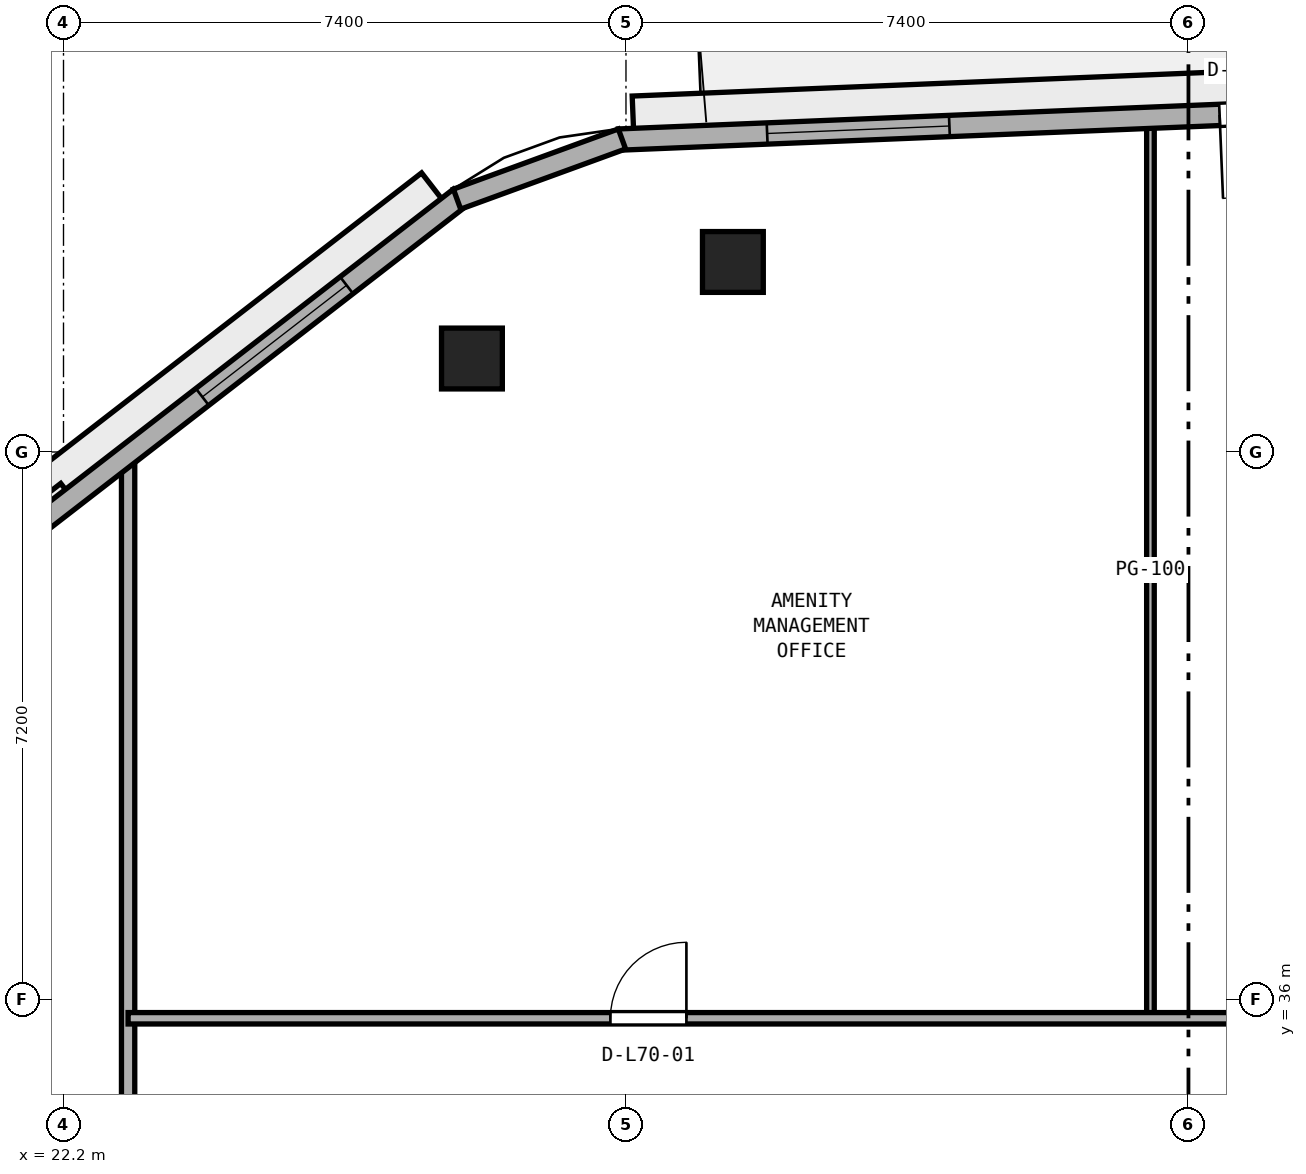
"""IFC4 building model, lengths in metres.
Left out: names, types, materials, properties, quantities, classifications, styles, units other than length and angle.
Written with IfcOpenShell. Run it as: python <this file> out.ifc"""

import sys

from ifc_helpers import new_model, si_unit, direction, frame, frame_2d, origin, origin_2d, place, context, subcontext, project, spatial, rectangle, extrude, element, fill, save


model = new_model("IFC4")
c1 = context("Model", 3, precision=1e-05, world=origin(), true_north=direction((0.0, 1.0)))
c2 = subcontext(c1, "Body", "Model", "MODEL_VIEW")
j1 = project(units=[si_unit("LENGTHUNIT", "METRE"), si_unit("PLANEANGLEUNIT", "RADIAN")], contexts=[c1])
p1 = place(None, origin())
s1 = spatial("IfcSite", under=j1, at=p1, CompositionType="ELEMENT")
p2 = place(p1, origin())
s2 = spatial("IfcBuilding", under=s1, at=p2, CompositionType="ELEMENT")
p3 = place(p2, frame((0.0, 0.0, 274.4)))
s3 = spatial("IfcBuildingStorey", under=s2, at=p3, CompositionType="ELEMENT", Elevation=274.4)
for number, where, z_axis, x_axis in (
    (1, (31.007, 45.7, 0.0), (0.0, 0.0, 1.0), (1.0, 0.0, 0.0)),
    (2, (27.573, 44.43, 0.0), (0.0, 0.0, 1.0), (1.0, 0.0, 0.0)),
):
    element("IfcColumn", number, at=place(p3, frame(where, z_axis=z_axis, x_axis=x_axis)), inside=s3, PredefinedType="COLUMN", context=c2, shape_type="SweptSolid", body=[
        extrude(rectangle(XDim=0.8, YDim=0.8, at=origin_2d()), origin(), (0.0, 0.0, 1.0), 3.8),
    ])
p4 = place(p3, frame((36.5, 35.75, 0.0), z_axis=(0.0, 0.0, 1.0), x_axis=(0.0, 1.0, 0.0)))
e3 = element("IfcWall", 3, at=p4, inside=s3, PredefinedType="PARTITIONING", context=c2, shape_type="SweptSolid", body=[
    extrude(rectangle(XDim=11.783, YDim=0.1, at=frame_2d((5.891, 0.0))), origin(), (0.0, 0.0, 1.0), 3.54),
])
p5 = place(p3, frame((23.05, 6.894, 0.0), z_axis=(0.0, 0.0, 1.0), x_axis=(0.0, 1.0, 0.0)))
e4 = element("IfcWall", 4, at=p5, inside=s3, PredefinedType="PARTITIONING", context=c2, shape_type="SweptSolid", body=[
    extrude(rectangle(XDim=36.312, YDim=0.175, at=frame_2d((18.156, 0.0))), origin(), (0.0, 0.0, 1.0), 3.54),
])
p6 = place(p5, frame((9.031, 0.0, 0.0)))
e5 = element("IfcOpeningElement", 5, at=p6, cuts=e4, PredefinedType="OPENING", context=c2, shape_type="SweptSolid", body=[
    extrude(rectangle(XDim=0.9, YDim=2.1, at=frame_2d((0.45, 1.05))), frame((0.0, 0.097, 0.0), z_axis=(0.0, -1.0, 0.0), x_axis=(1.0, 0.0, 0.0)), (0.0, 0.0, 1.0), 0.195),
])
p7 = place(p5, frame((14.056, 0.0, 0.0)))
e6 = element("IfcOpeningElement", 6, at=p7, cuts=e4, PredefinedType="OPENING", context=c2, shape_type="SweptSolid", body=[
    extrude(rectangle(XDim=0.9, YDim=2.1, at=frame_2d((0.45, 1.05))), frame((0.0, 0.097, 0.0), z_axis=(0.0, -1.0, 0.0), x_axis=(1.0, 0.0, 0.0)), (0.0, 0.0, 1.0), 0.195),
])
p8 = place(p5, frame((20.606, 0.0, 0.0)))
e7 = element("IfcOpeningElement", 7, at=p8, cuts=e4, PredefinedType="OPENING", context=c2, shape_type="SweptSolid", body=[
    extrude(rectangle(XDim=1.0, YDim=2.12, at=frame_2d((0.5, 1.06))), frame((0.0, 0.097, 0.0), z_axis=(0.0, -1.0, 0.0), x_axis=(1.0, 0.0, 0.0)), (0.0, 0.0, 1.0), 0.195),
])
p9 = place(p5, frame((26.181, 0.0, 0.0)))
e8 = element("IfcOpeningElement", 8, at=p9, cuts=e4, PredefinedType="OPENING", context=c2, shape_type="SweptSolid", body=[
    extrude(rectangle(XDim=0.9, YDim=2.1, at=frame_2d((0.45, 1.05))), frame((0.0, 0.097, 0.0), z_axis=(0.0, -1.0, 0.0), x_axis=(1.0, 0.0, 0.0)), (0.0, 0.0, 1.0), 0.195),
])
p10 = place(p3, frame((23.05, 35.75, 0.0), z_axis=(0.0, 0.0, 1.0), x_axis=(1.0, 0.0, 0.0)))
e9 = element("IfcWall", 9, at=p10, inside=s3, PredefinedType="PARTITIONING", context=c2, shape_type="SweptSolid", body=[
    extrude(rectangle(XDim=25.55, YDim=0.15, at=frame_2d((12.775, 0.0))), origin(), (0.0, 0.0, 1.0), 3.54),
])
p11 = place(p10, frame((6.345, 0.0, 0.0)))
e10 = element("IfcOpeningElement", 10, at=p11, cuts=e9, PredefinedType="OPENING", context=c2, shape_type="SweptSolid", body=[
    extrude(rectangle(XDim=1.0, YDim=2.12, at=frame_2d((0.5, 1.06))), frame((0.0, 0.085, 0.0), z_axis=(0.0, -1.0, 0.0), x_axis=(1.0, 0.0, 0.0)), (0.0, 0.0, 1.0), 0.17),
])
p12 = place(p10, frame((18.93, 0.0, 0.0)))
e11 = element("IfcOpeningElement", 11, at=p12, cuts=e9, PredefinedType="OPENING", context=c2, shape_type="SweptSolid", body=[
    extrude(rectangle(XDim=0.9, YDim=2.1, at=frame_2d((0.45, 1.05))), frame((0.0, 0.085, 0.0), z_axis=(0.0, -1.0, 0.0), x_axis=(1.0, 0.0, 0.0)), (0.0, 0.0, 1.0), 0.17),
])
p13 = place(p3, frame((46.414, 48.005, 0.0), z_axis=(0.0, 0.0, 1.0), x_axis=(-0.999156194126, -0.041071885021, 0.0)))
e12 = element("IfcWall", 12, at=p13, inside=s3, PredefinedType="STANDARD", context=c2, shape_type="SweptSolid", body=[
    extrude(rectangle(XDim=16.923, YDim=0.28, at=frame_2d((8.461, 0.0))), origin(), (0.0, 0.0, 1.0), 3.54),
])
p14 = place(p13, frame((7.912, 0.0, 0.0)))
e13 = element("IfcOpeningElement", 13, at=p14, cuts=e12, PredefinedType="OPENING", context=c2, shape_type="SweptSolid", body=[
    extrude(rectangle(XDim=1.1, YDim=2.2, at=frame_2d((0.55, 1.1))), frame((0.0, 0.15, 0.0), z_axis=(0.0, -1.0, 0.0), x_axis=(1.0, 0.0, 0.0)), (0.0, 0.0, 1.0), 0.3),
])
p15 = place(p13, frame((1.954, 0.0, 0.9)))
e14 = element("IfcOpeningElement", 14, at=p15, cuts=e12, PredefinedType="OPENING", context=c2, shape_type="SweptSolid", body=[
    extrude(rectangle(XDim=2.4, YDim=1.75, at=frame_2d((1.2, 0.875))), frame((0.0, 0.15, 0.0), z_axis=(0.0, -1.0, 0.0), x_axis=(1.0, 0.0, 0.0)), (0.0, 0.0, 1.0), 0.3),
])
p16 = place(p13, frame((12.569, 0.0, 0.9)))
e15 = element("IfcOpeningElement", 15, at=p16, cuts=e12, PredefinedType="OPENING", context=c2, shape_type="SweptSolid", body=[
    extrude(rectangle(XDim=2.4, YDim=1.75, at=frame_2d((1.2, 0.875))), frame((0.0, 0.15, 0.0), z_axis=(0.0, -1.0, 0.0), x_axis=(1.0, 0.0, 0.0)), (0.0, 0.0, 1.0), 0.3),
])
p17 = place(p3, frame((27.415, 46.547, 0.0), z_axis=(0.0, 0.0, 1.0), x_axis=(-0.790789745248, -0.612087884875, 0.0)))
e16 = element("IfcWall", 16, at=p17, inside=s3, PredefinedType="STANDARD", context=c2, shape_type="SweptSolid", body=[
    extrude(rectangle(XDim=16.509, YDim=0.28, at=frame_2d((8.254, 0.0))), origin(), (0.0, 0.0, 1.0), 3.54),
])
p18 = place(p17, frame((1.885, 0.0, 0.9)))
e17 = element("IfcOpeningElement", 17, at=p18, cuts=e16, PredefinedType="OPENING", context=c2, shape_type="SweptSolid", body=[
    extrude(rectangle(XDim=2.4, YDim=1.75, at=frame_2d((1.2, 0.875))), frame((0.0, 0.15, 0.0), z_axis=(0.0, -1.0, 0.0), x_axis=(1.0, 0.0, 0.0)), (0.0, 0.0, 1.0), 0.3),
])
p19 = place(p17, frame((7.055, 0.0, 0.9)))
e18 = element("IfcOpeningElement", 18, at=p19, cuts=e16, PredefinedType="OPENING", context=c2, shape_type="SweptSolid", body=[
    extrude(rectangle(XDim=2.4, YDim=1.75, at=frame_2d((1.2, 0.875))), frame((0.0, 0.15, 0.0), z_axis=(0.0, -1.0, 0.0), x_axis=(1.0, 0.0, 0.0)), (0.0, 0.0, 1.0), 0.3),
])
p20 = place(p17, frame((12.224, 0.0, 0.9)))
e19 = element("IfcOpeningElement", 19, at=p20, cuts=e16, PredefinedType="OPENING", context=c2, shape_type="SweptSolid", body=[
    extrude(rectangle(XDim=2.4, YDim=1.75, at=frame_2d((1.2, 0.875))), frame((0.0, 0.15, 0.0), z_axis=(0.0, -1.0, 0.0), x_axis=(1.0, 0.0, 0.0)), (0.0, 0.0, 1.0), 0.3),
])
p21 = place(p3, frame((29.547, 47.318, 0.0), z_axis=(0.0, 0.0, 1.0), x_axis=(-0.93940703724, -0.342803760748, 0.0)))
e20 = element("IfcWall", 20, at=p21, inside=s3, PredefinedType="STANDARD", context=c2, shape_type="SweptSolid", body=[
    extrude(rectangle(XDim=2.31, YDim=0.28, at=frame_2d((1.155, 0.0))), origin(), (0.0, 0.0, 1.0), 3.54),
])
p22 = place(p11, origin())
e21 = element("IfcDoor", 21, at=p22, inside=s3, OperationType="SINGLE_SWING_RIGHT", PredefinedType="DOOR", context=c2, shape_type="SweptSolid", body=[
    extrude(rectangle(XDim=1.0, YDim=2.12, at=frame_2d((0.5, 1.06))), frame((0.0, 0.025, 0.0), z_axis=(0.0, -1.0, 0.0), x_axis=(1.0, 0.0, 0.0)), (0.0, 0.0, 1.0), 0.05),
])
fill(e10, e21)
p23 = place(p14, origin())
e22 = element("IfcDoor", 22, at=p23, inside=s3, OperationType="SINGLE_SWING_RIGHT", PredefinedType="DOOR", context=c2, shape_type="SweptSolid", body=[
    extrude(rectangle(XDim=1.1, YDim=2.2, at=frame_2d((0.55, 1.1))), frame((0.0, 0.025, 0.0), z_axis=(0.0, -1.0, 0.0), x_axis=(1.0, 0.0, 0.0)), (0.0, 0.0, 1.0), 0.05),
])
fill(e13, e22)
p24 = place(p16, origin())
e23 = element("IfcWindow", 23, at=p24, inside=s3, PartitioningType="SINGLE_PANEL", PredefinedType="WINDOW", context=c2, shape_type="SweptSolid", body=[
    extrude(rectangle(XDim=2.4, YDim=1.75, at=frame_2d((1.2, 0.875))), frame((0.0, 0.03, 0.0), z_axis=(0.0, -1.0, 0.0), x_axis=(1.0, 0.0, 0.0)), (0.0, 0.0, 1.0), 0.06),
])
fill(e15, e23)
p25 = place(p18, origin())
e24 = element("IfcWindow", 24, at=p25, inside=s3, PartitioningType="SINGLE_PANEL", PredefinedType="WINDOW", context=c2, shape_type="SweptSolid", body=[
    extrude(rectangle(XDim=2.4, YDim=1.75, at=frame_2d((1.2, 0.875))), frame((0.0, 0.03, 0.0), z_axis=(0.0, -1.0, 0.0), x_axis=(1.0, 0.0, 0.0)), (0.0, 0.0, 1.0), 0.06),
])
fill(e17, e24)
save(model, sys.argv[1])
